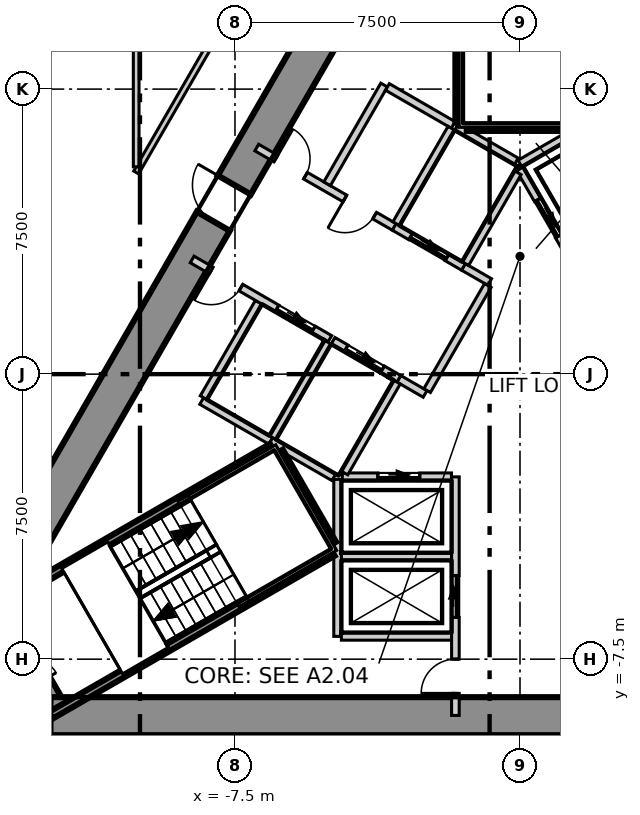
"""IFC4 building model, lengths in metres.
Left out: names, types, materials, properties, quantities, classifications, styles, units other than length and angle.
Written with IfcOpenShell. Run it as: python <this file> out.ifc"""

import sys

from ifc_helpers import new_model, si_unit, direction, frame, frame_2d, origin, place, context, subcontext, project, spatial, polyline, rectangle, outline, extrude, element, fill, save


model = new_model("IFC4")
c1 = context("Model", 3, precision=1e-05, world=origin(), true_north=direction((0.0, 1.0)))
c2 = subcontext(c1, "Body", "Model", "MODEL_VIEW")
j1 = project(units=[si_unit("LENGTHUNIT", "METRE"), si_unit("PLANEANGLEUNIT", "RADIAN")], contexts=[c1])
p1 = place(None, origin())
s1 = spatial("IfcSite", under=j1, at=p1, CompositionType="ELEMENT")
p2 = place(p1, origin())
s2 = spatial("IfcBuilding", under=s1, at=p2, CompositionType="ELEMENT")
p3 = place(p2, frame((0.0, 0.0, 14.5)))
s3 = spatial("IfcBuildingStorey", under=s2, at=p3, CompositionType="ELEMENT", Elevation=14.5)
p4 = place(p3, frame((-1.617, 15.2, -0.4), z_axis=(0.0, 0.0, 1.0), x_axis=(-0.499992141631, -0.866029940768, 0.0)))
e1 = element("IfcWall", 1, at=p4, inside=s3, PredefinedType="SHEAR", context=c2, shape_type="SweptSolid", body=[
    extrude(outline(polyline([(-0.289, -0.499), (1.656, -0.499), (3.601, -0.499), (5.547, -0.499), (7.492, -0.499), (9.437, -0.5), (11.382, -0.5), (13.328, -0.5), (15.273, -0.5), (17.218, -0.5), (19.163, -0.5), (21.109, -0.5), (23.054, -0.5), (24.999, -0.5), (24.422, 0.5), (22.566, 0.5), (20.709, 0.5), (18.853, 0.5), (16.997, 0.5), (15.14, 0.5), (13.284, 0.5), (11.427, 0.5), (9.571, 0.5), (7.715, 0.5), (5.858, 0.5), (4.002, 0.5), (2.146, 0.5), (0.289, 0.5), (-0.289, -0.499)])), origin(), (0.0, 0.0, 1.0), 5.4),
])
p5 = place(p4, frame((11.805, 0.0, 0.4)))
e2 = element("IfcOpeningElement", 2, at=p5, cuts=e1, PredefinedType="OPENING", context=c2, shape_type="SweptSolid", body=[
    extrude(rectangle(XDim=1.1, YDim=2.1, at=frame_2d((0.55, 1.05))), frame((0.0, 0.51, 0.0), z_axis=(0.0, -1.0, 0.0), x_axis=(1.0, 0.0, 0.0)), (0.0, 0.0, 1.0), 1.02),
])
p6 = place(p3, frame((-13.972, -6.2, -0.4), z_axis=(0.0, 0.0, 1.0), x_axis=(0.500077567175, -0.865980615723, 0.0)))
e3 = element("IfcWall", 3, at=p6, inside=s3, PredefinedType="SHEAR", context=c2, shape_type="SweptSolid", body=[
    extrude(outline(polyline([(-0.289, -0.5), (1.616, -0.5), (3.522, -0.5), (2.944, 0.499), (1.617, 0.5), (0.289, 0.5), (-0.289, -0.5)])), origin(), (0.0, 0.0, 1.0), 5.4),
])
p7 = place(p6, frame((0.917, 0.0, 0.4)))
e4 = element("IfcOpeningElement", 4, at=p7, cuts=e3, PredefinedType="OPENING", context=c2, shape_type="SweptSolid", body=[
    extrude(rectangle(XDim=1.4, YDim=2.1, at=frame_2d((0.7, 1.05))), frame((0.0, 0.51, 0.0), z_axis=(0.0, -1.0, 0.0), x_axis=(1.0, 0.0, 0.0)), (0.0, 0.0, 1.0), 1.02),
])
p8 = place(p3, frame((-12.355, -9.0, -0.4), z_axis=(0.0, 0.0, 1.0), x_axis=(1.0, 0.0, 0.0)))
e5 = element("IfcWall", 5, at=p8, inside=s3, PredefinedType="SHEAR", context=c2, shape_type="SweptSolid", body=[
    extrude(outline(polyline([(-0.289, -0.5), (1.656, -0.5), (3.601, -0.5), (5.547, -0.5), (7.492, -0.5), (9.437, -0.5), (11.382, -0.5), (13.328, -0.5), (15.273, -0.5), (17.218, -0.5), (19.163, -0.5), (21.109, -0.5), (23.054, -0.5), (24.999, -0.5), (24.422, 0.5), (22.566, 0.5), (20.709, 0.5), (18.853, 0.5), (16.996, 0.5), (15.14, 0.5), (13.283, 0.5), (11.427, 0.5), (9.57, 0.5), (7.714, 0.5), (5.857, 0.5), (4.001, 0.5), (2.145, 0.5), (0.288, 0.5), (-0.289, -0.5)])), origin(), (0.0, 0.0, 1.0), 5.4),
])
p9 = place(p3, frame((-10.1, 5.306, 0.0), z_axis=(0.0, 0.0, 1.0), x_axis=(0.500004804517, 0.866022629878, 0.0)))
e6 = element("IfcWall", 6, at=p9, inside=s3, PredefinedType="PARTITIONING", context=c2, shape_type="SweptSolid", body=[
    extrude(rectangle(XDim=14.196, YDim=0.15, at=frame_2d((7.098, 0.0))), origin(), (0.0, 0.0, 1.0), 5.0),
])
p10 = place(p9, frame((4.951, 0.0, 0.0)))
e7 = element("IfcOpeningElement", 7, at=p10, cuts=e6, PredefinedType="OPENING", context=c2, shape_type="SweptSolid", body=[
    extrude(rectangle(XDim=1.0, YDim=2.1, at=frame_2d((0.5, 1.05))), frame((0.0, 0.085, 0.0), z_axis=(0.0, -1.0, 0.0), x_axis=(1.0, 0.0, 0.0)), (0.0, 0.0, 1.0), 0.17),
])
p11 = place(p3, frame((-10.1, 5.456, 0.0), z_axis=(0.0, 0.0, 1.0), x_axis=(0.0, 1.0, 0.0)))
e8 = element("IfcWall", 8, at=p11, inside=s3, PredefinedType="PARTITIONING", context=c2, shape_type="SweptSolid", body=[
    extrude(rectangle(XDim=8.944, YDim=0.15, at=frame_2d((4.472, 0.0))), origin(), (0.0, 0.0, 1.0), 5.0),
])
p12 = place(p3, frame((-8.376, -0.707, 0.0), z_axis=(0.0, 0.0, 1.0), x_axis=(0.866067520717, -0.499927044236, 0.0)))
e9 = element("IfcWall", 9, at=p12, inside=s3, PredefinedType="SOLIDWALL", context=c2, shape_type="SweptSolid", body=[
    extrude(rectangle(XDim=2.1, YDim=0.2, at=frame_2d((1.05, 0.0))), origin(), (0.0, 0.0, 1.0), 5.0),
])
p13 = place(p3, frame((-8.326, -0.62, 0.0), z_axis=(0.0, 0.0, 1.0), x_axis=(0.500023687443, 0.866011727401, 0.0)))
e10 = element("IfcWall", 10, at=p13, inside=s3, PredefinedType="SOLIDWALL", context=c2, shape_type="SweptSolid", body=[
    extrude(rectangle(XDim=2.9, YDim=0.2, at=frame_2d((1.45, 0.0))), origin(), (0.0, 0.0, 1.0), 5.0),
])
p14 = place(p3, frame((-4.7, -4.8, 0.0), z_axis=(0.0, 0.0, 1.0), x_axis=(1.0, 0.0, 0.0)))
e11 = element("IfcWall", 11, at=p14, inside=s3, PredefinedType="SOLIDWALL", context=c2, shape_type="SweptSolid", body=[
    extrude(rectangle(XDim=2.9, YDim=0.2, at=frame_2d((1.45, 0.0))), origin(), (0.0, 0.0, 1.0), 5.0),
])
p15 = place(p3, frame((-4.8, -6.9, 0.0), z_axis=(0.0, 0.0, 1.0), x_axis=(0.0, 1.0, 0.0)))
e12 = element("IfcWall", 12, at=p15, inside=s3, PredefinedType="SOLIDWALL", context=c2, shape_type="SweptSolid", body=[
    extrude(rectangle(XDim=4.131, YDim=0.2, at=frame_2d((2.065, 0.0))), origin(), (0.0, 0.0, 1.0), 5.0),
])
p16 = place(p3, frame((-4.7, -6.9, 0.0), z_axis=(0.0, 0.0, 1.0), x_axis=(1.0, 0.0, 0.0)))
e13 = element("IfcWall", 13, at=p16, inside=s3, PredefinedType="SOLIDWALL", context=c2, shape_type="SweptSolid", body=[
    extrude(rectangle(XDim=2.9, YDim=0.2, at=frame_2d((1.45, 0.0))), origin(), (0.0, 0.0, 1.0), 5.0),
])
p17 = place(p3, frame((-1.7, -8.98, 0.0), z_axis=(0.0, 0.0, 1.0), x_axis=(0.0, 1.0, 0.0)))
e14 = element("IfcWall", 14, at=p17, inside=s3, PredefinedType="SOLIDWALL", context=c2, shape_type="SweptSolid", body=[
    extrude(rectangle(XDim=6.277, YDim=0.2, at=frame_2d((3.139, 0.0))), origin(), (0.0, 0.0, 1.0), 5.0),
])
p18 = place(p17, frame((2.58, 0.0, 0.0)))
e15 = element("IfcOpeningElement", 15, at=p18, cuts=e14, PredefinedType="OPENING", context=c2, shape_type="SweptSolid", body=[
    extrude(rectangle(XDim=1.1, YDim=2.1, at=frame_2d((0.55, 1.05))), frame((0.0, 0.11, 0.0), z_axis=(0.0, -1.0, 0.0), x_axis=(1.0, 0.0, 0.0)), (0.0, 0.0, 1.0), 0.22),
])
p19 = place(p17, frame((0.58, 0.0, 0.0)))
e16 = element("IfcOpeningElement", 16, at=p19, cuts=e14, PredefinedType="OPENING", context=c2, shape_type="SweptSolid", body=[
    extrude(rectangle(XDim=0.9, YDim=2.1, at=frame_2d((0.45, 1.05))), frame((0.0, 0.11, 0.0), z_axis=(0.0, -1.0, 0.0), x_axis=(1.0, 0.0, 0.0)), (0.0, 0.0, 1.0), 0.22),
])
p20 = place(p3, frame((-4.676, -2.7, 0.0), z_axis=(0.0, 0.0, 1.0), x_axis=(1.0, 0.0, 0.0)))
e17 = element("IfcWall", 17, at=p20, inside=s3, PredefinedType="SOLIDWALL", context=c2, shape_type="SweptSolid", body=[
    extrude(rectangle(XDim=2.873, YDim=0.2, at=frame_2d((1.437, 0.0))), origin(), (0.0, 0.0, 1.0), 5.0),
])
p21 = place(p20, frame((0.937, 0.0, 0.0)))
e18 = element("IfcOpeningElement", 18, at=p21, cuts=e17, PredefinedType="OPENING", context=c2, shape_type="SweptSolid", body=[
    extrude(rectangle(XDim=1.1, YDim=2.1, at=frame_2d((0.55, 1.05))), frame((0.0, 0.11, 0.0), z_axis=(0.0, -1.0, 0.0), x_axis=(1.0, 0.0, 0.0)), (0.0, 0.0, 1.0), 0.22),
])
p22 = place(p3, frame((-0.002, 5.541, 0.0), z_axis=(0.0, 0.0, 1.0), x_axis=(0.86600155993, 0.500041296494, 0.0)))
e19 = element("IfcWall", 19, at=p22, inside=s3, PredefinedType="SOLIDWALL", context=c2, shape_type="SweptSolid", body=[
    extrude(rectangle(XDim=4.132, YDim=0.2, at=frame_2d((2.066, 0.0))), origin(), (0.0, 0.0, 1.0), 5.0),
])
p23 = place(p3, frame((0.0, 5.4, 0.0), z_axis=(0.0, 0.0, 1.0), x_axis=(0.500103862429, -0.865965430478, 0.0)))
e20 = element("IfcWall", 20, at=p23, inside=s3, PredefinedType="SOLIDWALL", context=c2, shape_type="SweptSolid", body=[
    extrude(rectangle(XDim=2.973, YDim=0.2, at=frame_2d((1.487, 0.0))), origin(), (0.0, 0.0, 1.0), 5.0),
])
p24 = place(p23, frame((0.937, 0.0, 0.0)))
e21 = element("IfcOpeningElement", 21, at=p24, cuts=e20, PredefinedType="OPENING", context=c2, shape_type="SweptSolid", body=[
    extrude(rectangle(XDim=1.1, YDim=2.1, at=frame_2d((0.55, 1.05))), frame((0.0, 0.11, 0.0), z_axis=(0.0, -1.0, 0.0), x_axis=(1.0, 0.0, 0.0)), (0.0, 0.0, 1.0), 0.22),
])
p25 = place(p3, frame((-8.627, 3.018, 0.0), z_axis=(0.0, 0.0, 1.0), x_axis=(0.866039775641, -0.499975106388, 0.0)))
e22 = element("IfcWall", 22, at=p25, inside=s3, PredefinedType="SOLIDWALL", context=c2, shape_type="SweptSolid", body=[
    extrude(rectangle(XDim=4.182, YDim=0.2, at=frame_2d((2.091, 0.0))), origin(), (0.0, 0.0, 1.0), 5.0),
])
p26 = place(p25, frame((2.58, 0.0, 0.0)))
e23 = element("IfcOpeningElement", 23, at=p26, cuts=e22, PredefinedType="OPENING", context=c2, shape_type="SweptSolid", body=[
    extrude(rectangle(XDim=1.1, YDim=2.1, at=frame_2d((0.55, 1.05))), frame((0.0, 0.11, 0.0), z_axis=(0.0, -1.0, 0.0), x_axis=(1.0, 0.0, 0.0)), (0.0, 0.0, 1.0), 0.22),
])
p27 = place(p25, frame((0.58, 0.0, 0.0)))
e24 = element("IfcOpeningElement", 24, at=p27, cuts=e22, PredefinedType="OPENING", context=c2, shape_type="SweptSolid", body=[
    extrude(rectangle(XDim=0.9, YDim=2.1, at=frame_2d((0.45, 1.05))), frame((0.0, 0.11, 0.0), z_axis=(0.0, -1.0, 0.0), x_axis=(1.0, 0.0, 0.0)), (0.0, 0.0, 1.0), 0.22),
])
p28 = place(p3, frame((-3.188, -0.122, 0.0), z_axis=(0.0, 0.0, 1.0), x_axis=(0.865705793592, -0.50055317294, 0.0)))
e25 = element("IfcWall", 25, at=p28, inside=s3, PredefinedType="SOLIDWALL", context=c2, shape_type="SweptSolid", body=[
    extrude(rectangle(XDim=0.797, YDim=0.2, at=frame_2d((0.398, 0.0))), origin(), (0.0, 0.0, 1.0), 5.0),
])
p29 = place(p3, frame((-6.927, 5.962, 0.0), z_axis=(0.0, 0.0, 1.0), x_axis=(0.866065051207, -0.49993132236, 0.0)))
e26 = element("IfcWall", 26, at=p29, inside=s3, PredefinedType="SOLIDWALL", context=c2, shape_type="SweptSolid", body=[
    extrude(rectangle(XDim=4.182, YDim=0.2, at=frame_2d((2.091, 0.0))), origin(), (0.0, 0.0, 1.0), 5.0),
])
p30 = place(p29, frame((2.68, 0.0, 0.0)))
e27 = element("IfcOpeningElement", 27, at=p30, cuts=e26, PredefinedType="OPENING", context=c2, shape_type="SweptSolid", body=[
    extrude(rectangle(XDim=0.9, YDim=2.1, at=frame_2d((0.45, 1.05))), frame((0.0, 0.11, 0.0), z_axis=(0.0, -1.0, 0.0), x_axis=(1.0, 0.0, 0.0)), (0.0, 0.0, 1.0), 0.22),
])
p31 = place(p29, frame((0.58, 0.0, 0.0)))
e28 = element("IfcOpeningElement", 28, at=p31, cuts=e26, PredefinedType="OPENING", context=c2, shape_type="SweptSolid", body=[
    extrude(rectangle(XDim=0.9, YDim=2.1, at=frame_2d((0.45, 1.05))), frame((0.0, 0.11, 0.0), z_axis=(0.0, -1.0, 0.0), x_axis=(1.0, 0.0, 0.0)), (0.0, 0.0, 1.0), 0.22),
])
p32 = place(p3, frame((-1.488, 2.822, 0.0), z_axis=(0.0, 0.0, 1.0), x_axis=(0.866236612152, -0.499633997809, 0.0)))
e29 = element("IfcWall", 29, at=p32, inside=s3, PredefinedType="SOLIDWALL", context=c2, shape_type="SweptSolid", body=[
    extrude(rectangle(XDim=0.796, YDim=0.2, at=frame_2d((0.398, 0.0))), origin(), (0.0, 0.0, 1.0), 5.0),
])
p33 = place(p3, frame((-5.076, 5.009, 0.0), z_axis=(0.0, 0.0, 1.0), x_axis=(0.50002537861, 0.866010750942, 0.0)))
e30 = element("IfcWall", 30, at=p33, inside=s3, PredefinedType="SOLIDWALL", context=c2, shape_type="SweptSolid", body=[
    extrude(rectangle(XDim=3.0, YDim=0.2, at=frame_2d((1.5, 0.0))), origin(), (0.0, 0.0, 1.0), 5.0),
])
p34 = place(p3, frame((-3.489, 7.557, 0.0), z_axis=(0.0, 0.0, 1.0), x_axis=(0.866010750942, -0.50002537861, 0.0)))
e31 = element("IfcWall", 31, at=p34, inside=s3, PredefinedType="SOLIDWALL", context=c2, shape_type="SweptSolid", body=[
    extrude(rectangle(XDim=2.0, YDim=0.2, at=frame_2d((1.0, 0.0))), origin(), (0.0, 0.0, 1.0), 5.0),
])
p35 = place(p3, frame((-2.444, -0.433, 0.0), z_axis=(0.0, 0.0, 1.0), x_axis=(0.500035624827, 0.866004834804, 0.0)))
e32 = element("IfcWall", 32, at=p35, inside=s3, PredefinedType="SOLIDWALL", context=c2, shape_type="SweptSolid", body=[
    extrude(rectangle(XDim=3.194, YDim=0.2, at=frame_2d((1.597, 0.0))), origin(), (0.0, 0.0, 1.0), 5.0),
])
p36 = place(p3, frame((-6.557, -1.757, 0.0), z_axis=(0.0, 0.0, 1.0), x_axis=(0.8659754619, -0.500086491905, 0.0)))
e33 = element("IfcWall", 33, at=p36, inside=s3, PredefinedType="SOLIDWALL", context=c2, shape_type="SweptSolid", body=[
    extrude(rectangle(XDim=1.916, YDim=0.2, at=frame_2d((0.958, 0.0))), origin(), (0.0, 0.0, 1.0), 5.0),
])
p37 = place(p3, frame((-6.507, -1.67, 0.0), z_axis=(0.0, 0.0, 1.0), x_axis=(0.50012328804, 0.865954211699, 0.0)))
e34 = element("IfcWall", 34, at=p37, inside=s3, PredefinedType="SOLIDWALL", context=c2, shape_type="SweptSolid", body=[
    extrude(rectangle(XDim=2.9, YDim=0.2, at=frame_2d((1.45, 0.0))), origin(), (0.0, 0.0, 1.0), 5.0),
])
p38 = place(p3, frame((-4.92, 0.878, 0.0), z_axis=(0.0, 0.0, 1.0), x_axis=(0.866010750942, -0.50002537861, 0.0)))
e35 = element("IfcWall", 35, at=p38, inside=s3, PredefinedType="SOLIDWALL", context=c2, shape_type="SweptSolid", body=[
    extrude(rectangle(XDim=2.0, YDim=0.2, at=frame_2d((1.0, 0.0))), origin(), (0.0, 0.0, 1.0), 5.0),
])
p39 = place(p38, frame((0.4, 0.0, 0.0)))
e36 = element("IfcOpeningElement", 36, at=p39, cuts=e35, PredefinedType="OPENING", context=c2, shape_type="SweptSolid", body=[
    extrude(rectangle(XDim=1.1, YDim=2.1, at=frame_2d((0.55, 1.05))), frame((0.0, 0.11, 0.0), z_axis=(0.0, -1.0, 0.0), x_axis=(1.0, 0.0, 0.0)), (0.0, 0.0, 1.0), 0.22),
])
p40 = place(p3, frame((-4.619, -2.6, 0.0), z_axis=(0.0, 0.0, 1.0), x_axis=(0.50009492287, 0.865970593103, 0.0)))
e37 = element("IfcWall", 37, at=p40, inside=s3, PredefinedType="SOLIDWALL", context=c2, shape_type="SweptSolid", body=[
    extrude(rectangle(XDim=2.761, YDim=0.2, at=frame_2d((1.381, 0.0))), origin(), (0.0, 0.0, 1.0), 5.0),
])
p41 = place(p3, frame((-3.309, 3.873, 0.0), z_axis=(0.0, 0.0, 1.0), x_axis=(0.866098583652, -0.499873227325, 0.0)))
e38 = element("IfcWall", 38, at=p41, inside=s3, PredefinedType="SOLIDWALL", context=c2, shape_type="SweptSolid", body=[
    extrude(rectangle(XDim=2.103, YDim=0.2, at=frame_2d((1.051, 0.0))), origin(), (0.0, 0.0, 1.0), 5.0),
])
p42 = place(p41, frame((0.502, 0.0, 0.0)))
e39 = element("IfcOpeningElement", 39, at=p42, cuts=e38, PredefinedType="OPENING", context=c2, shape_type="SweptSolid", body=[
    extrude(rectangle(XDim=1.1, YDim=2.1, at=frame_2d((0.55, 1.05))), frame((0.0, 0.11, 0.0), z_axis=(0.0, -1.0, 0.0), x_axis=(1.0, 0.0, 0.0)), (0.0, 0.0, 1.0), 0.22),
])
p43 = place(p3, frame((-3.257, 3.959, 0.0), z_axis=(0.0, 0.0, 1.0), x_axis=(0.50012328804, 0.865954211699, 0.0)))
e40 = element("IfcWall", 40, at=p43, inside=s3, PredefinedType="SOLIDWALL", context=c2, shape_type="SweptSolid", body=[
    extrude(rectangle(XDim=2.9, YDim=0.2, at=frame_2d((1.45, 0.0))), origin(), (0.0, 0.0, 1.0), 5.0),
])
p44 = place(p3, frame((-1.67, 6.507, 0.0), z_axis=(0.0, 0.0, 1.0), x_axis=(0.865941441609, -0.500145398563, 0.0)))
e41 = element("IfcWall", 41, at=p44, inside=s3, PredefinedType="SOLIDWALL", context=c2, shape_type="SweptSolid", body=[
    extrude(rectangle(XDim=1.815, YDim=0.2, at=frame_2d((0.908, 0.0))), origin(), (0.0, 0.0, 1.0), 5.0),
])
p45 = place(p3, frame((-1.438, 2.909, 0.0), z_axis=(0.0, 0.0, 1.0), x_axis=(0.499829630636, 0.866123744241, 0.0)))
e42 = element("IfcWall", 42, at=p45, inside=s3, PredefinedType="SOLIDWALL", context=c2, shape_type="SweptSolid", body=[
    extrude(rectangle(XDim=2.761, YDim=0.2, at=frame_2d((1.38, 0.0))), origin(), (0.0, 0.0, 1.0), 5.0),
])
p46 = place(p3, frame((-13.946, -6.204, 0.0), z_axis=(0.0, 0.0, 1.0), x_axis=(0.866036527536, 0.499980732602, 0.0)))
e43 = element("IfcWall", 43, at=p46, inside=s3, PredefinedType="SOLIDWALL", context=c2, shape_type="SweptSolid", body=[
    extrude(rectangle(XDim=8.564, YDim=0.2, at=frame_2d((4.282, 0.0))), origin(), (0.0, 0.0, 1.0), 5.0),
])
p47 = place(p3, frame((-6.329, -2.038, 0.0), z_axis=(0.0, 0.0, 1.0), x_axis=(0.500200581029, -0.865909567298, 0.0)))
e44 = element("IfcWall", 44, at=p47, inside=s3, PredefinedType="SOLIDWALL", context=c2, shape_type="SweptSolid", body=[
    extrude(rectangle(XDim=2.799, YDim=0.2, at=frame_2d((1.399, 0.0))), origin(), (0.0, 0.0, 1.0), 5.0),
])
p48 = place(p3, frame((-12.346, -8.976, 0.0), z_axis=(0.0, 0.0, 1.0), x_axis=(0.865987152174, 0.50006624788, 0.0)))
e45 = element("IfcWall", 45, at=p48, inside=s3, PredefinedType="SOLIDWALL", context=c2, shape_type="SweptSolid", body=[
    extrude(rectangle(XDim=8.565, YDim=0.2, at=frame_2d((4.282, 0.0))), origin(), (0.0, 0.0, 1.0), 5.0),
])
p49 = place(p3, frame((-1.4, 6.5, 0.0), z_axis=(0.0, 0.0, 1.0), x_axis=(1.0, 0.0, 0.0)))
e46 = element("IfcWall", 46, at=p49, inside=s3, PredefinedType="SOLIDWALL", context=c2, shape_type="SweptSolid", body=[
    extrude(rectangle(XDim=2.8, YDim=0.2, at=frame_2d((1.4, 0.0))), origin(), (0.0, 0.0, 1.0), 5.0),
])
p50 = place(p3, frame((-1.6, 6.615, 0.0), z_axis=(0.0, 0.0, 1.0), x_axis=(0.0, 1.0, 0.0)))
e47 = element("IfcWall", 47, at=p50, inside=s3, PredefinedType="SOLIDWALL", context=c2, shape_type="SweptSolid", body=[
    extrude(rectangle(XDim=8.565, YDim=0.2, at=frame_2d((4.282, 0.0))), origin(), (0.0, 0.0, 1.0), 5.0),
])
p51 = place(p21, origin())
e48 = element("IfcDoor", 48, at=p51, inside=s3, OperationType="SLIDING_TO_LEFT", PredefinedType="DOOR", context=c2, shape_type="SweptSolid", body=[
    extrude(rectangle(XDim=1.1, YDim=2.1, at=frame_2d((0.55, 1.05))), frame((0.0, 0.025, 0.0), z_axis=(0.0, -1.0, 0.0), x_axis=(1.0, 0.0, 0.0)), (0.0, 0.0, 1.0), 0.05),
])
fill(e18, e48)
p52 = place(p18, origin())
e49 = element("IfcDoor", 49, at=p52, inside=s3, OperationType="SLIDING_TO_LEFT", PredefinedType="DOOR", context=c2, shape_type="SweptSolid", body=[
    extrude(rectangle(XDim=1.1, YDim=2.1, at=frame_2d((0.55, 1.05))), frame((0.0, 0.025, 0.0), z_axis=(0.0, -1.0, 0.0), x_axis=(1.0, 0.0, 0.0)), (0.0, 0.0, 1.0), 0.05),
])
fill(e15, e49)
p53 = place(p24, origin())
e50 = element("IfcDoor", 50, at=p53, inside=s3, OperationType="SLIDING_TO_LEFT", PredefinedType="DOOR", context=c2, shape_type="SweptSolid", body=[
    extrude(rectangle(XDim=1.1, YDim=2.1, at=frame_2d((0.55, 1.05))), frame((0.0, 0.025, 0.0), z_axis=(0.0, -1.0, 0.0), x_axis=(1.0, 0.0, 0.0)), (0.0, 0.0, 1.0), 0.05),
])
fill(e21, e50)
p54 = place(p39, origin())
e51 = element("IfcDoor", 51, at=p54, inside=s3, OperationType="SLIDING_TO_LEFT", PredefinedType="DOOR", context=c2, shape_type="SweptSolid", body=[
    extrude(rectangle(XDim=1.1, YDim=2.1, at=frame_2d((0.55, 1.05))), frame((0.0, 0.025, 0.0), z_axis=(0.0, -1.0, 0.0), x_axis=(1.0, 0.0, 0.0)), (0.0, 0.0, 1.0), 0.05),
])
fill(e36, e51)
p55 = place(p42, origin())
e52 = element("IfcDoor", 52, at=p55, inside=s3, OperationType="SLIDING_TO_LEFT", PredefinedType="DOOR", context=c2, shape_type="SweptSolid", body=[
    extrude(rectangle(XDim=1.1, YDim=2.1, at=frame_2d((0.55, 1.05))), frame((0.0, 0.025, 0.0), z_axis=(0.0, -1.0, 0.0), x_axis=(1.0, 0.0, 0.0)), (0.0, 0.0, 1.0), 0.05),
])
fill(e39, e52)
p56 = place(p26, origin())
e53 = element("IfcDoor", 53, at=p56, inside=s3, OperationType="SLIDING_TO_LEFT", PredefinedType="DOOR", context=c2, shape_type="SweptSolid", body=[
    extrude(rectangle(XDim=1.1, YDim=2.1, at=frame_2d((0.55, 1.05))), frame((0.0, 0.025, 0.0), z_axis=(0.0, -1.0, 0.0), x_axis=(1.0, 0.0, 0.0)), (0.0, 0.0, 1.0), 0.05),
])
fill(e23, e53)
p57 = place(p30, origin())
e54 = element("IfcDoor", 54, at=p57, inside=s3, OperationType="SINGLE_SWING_LEFT", PredefinedType="DOOR", context=c2, shape_type="SweptSolid", body=[
    extrude(rectangle(XDim=0.9, YDim=2.1, at=frame_2d((0.45, 1.05))), frame((0.0, 0.025, 0.0), z_axis=(0.0, -1.0, 0.0), x_axis=(1.0, 0.0, 0.0)), (0.0, 0.0, 1.0), 0.05),
])
fill(e27, e54)
p58 = place(p5, origin())
e55 = element("IfcDoor", 55, at=p58, inside=s3, OperationType="SINGLE_SWING_LEFT", PredefinedType="DOOR", context=c2, shape_type="SweptSolid", body=[
    extrude(rectangle(XDim=1.1, YDim=2.1, at=frame_2d((0.55, 1.05))), frame((0.0, 0.025, 0.0), z_axis=(0.0, -1.0, 0.0), x_axis=(1.0, 0.0, 0.0)), (0.0, 0.0, 1.0), 0.05),
])
fill(e2, e55)
p59 = place(p27, origin())
e56 = element("IfcDoor", 56, at=p59, inside=s3, OperationType="SINGLE_SWING_LEFT", PredefinedType="DOOR", context=c2, shape_type="SweptSolid", body=[
    extrude(rectangle(XDim=0.9, YDim=2.1, at=frame_2d((0.45, 1.05))), frame((0.0, 0.025, 0.0), z_axis=(0.0, -1.0, 0.0), x_axis=(1.0, 0.0, 0.0)), (0.0, 0.0, 1.0), 0.05),
])
fill(e24, e56)
p60 = place(p19, origin())
e57 = element("IfcDoor", 57, at=p60, inside=s3, OperationType="SINGLE_SWING_RIGHT", PredefinedType="DOOR", context=c2, shape_type="SweptSolid", body=[
    extrude(rectangle(XDim=0.9, YDim=2.1, at=frame_2d((0.45, 1.05))), frame((0.0, 0.025, 0.0), z_axis=(0.0, -1.0, 0.0), x_axis=(1.0, 0.0, 0.0)), (0.0, 0.0, 1.0), 0.05),
])
fill(e16, e57)
p61 = place(p31, origin())
e58 = element("IfcDoor", 58, at=p61, inside=s3, OperationType="SINGLE_SWING_RIGHT", PredefinedType="DOOR", context=c2, shape_type="SweptSolid", body=[
    extrude(rectangle(XDim=0.9, YDim=2.1, at=frame_2d((0.45, 1.05))), frame((0.0, 0.025, 0.0), z_axis=(0.0, -1.0, 0.0), x_axis=(1.0, 0.0, 0.0)), (0.0, 0.0, 1.0), 0.05),
])
fill(e28, e58)
save(model, sys.argv[1])
